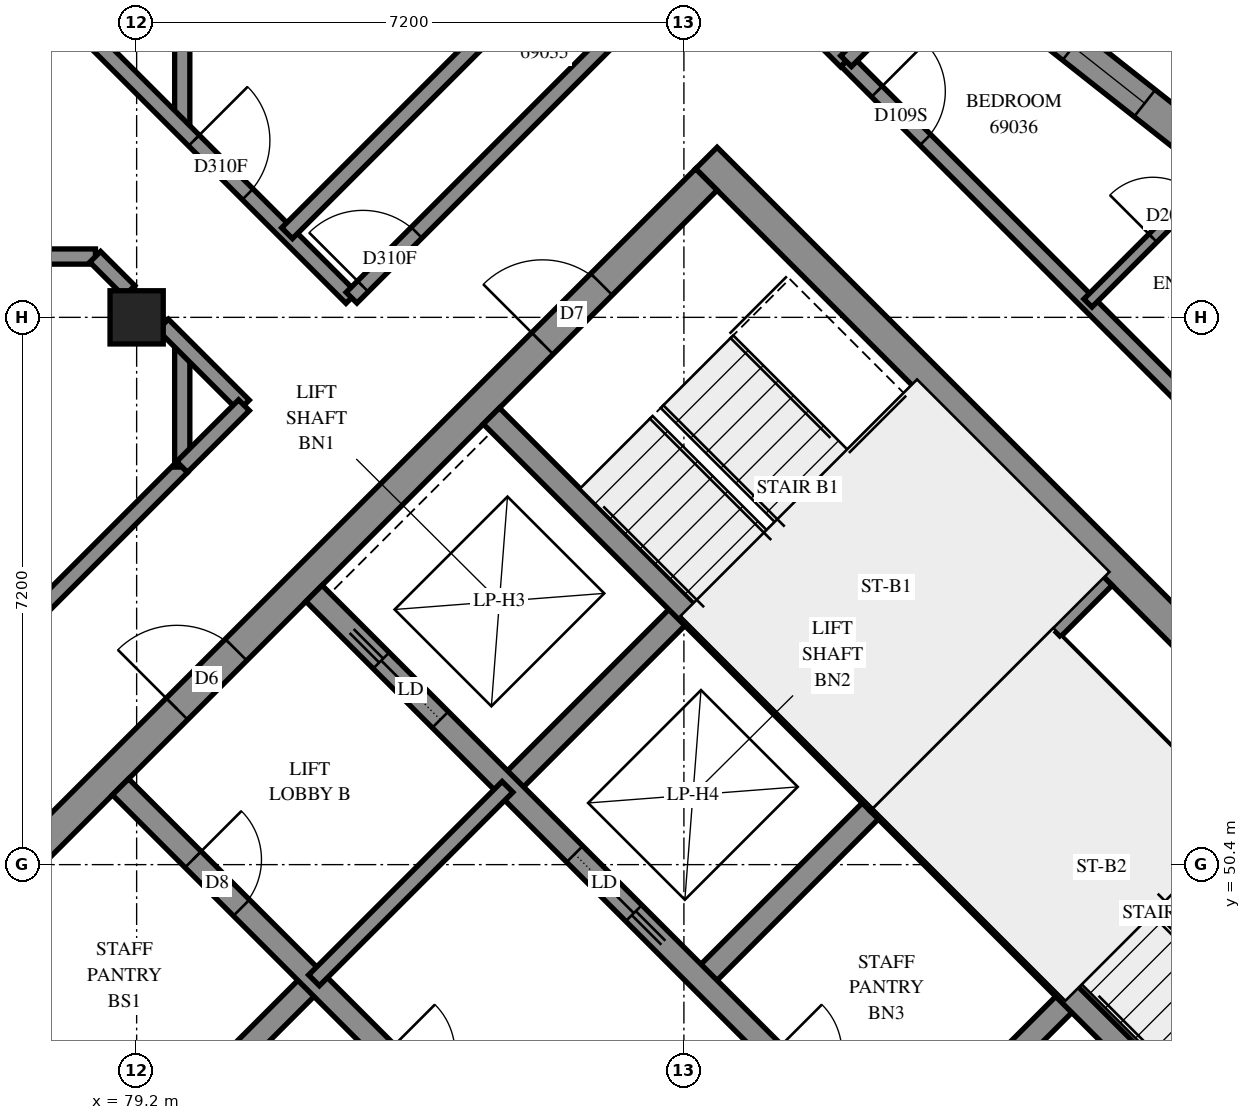
"""IFC4 building model, lengths in metres.
Left out: names, types, materials, properties, quantities, classifications, styles, units other than length and angle.
Written with IfcOpenShell. Run it as: python <this file> out.ifc"""

import sys

from ifc_helpers import new_model, si_unit, direction, frame, frame_2d, origin, origin_2d, place, context, subcontext, project, spatial, polyline, rectangle, outline, extrude, element, fill, save


model = new_model("IFC4")
c1 = context("Model", 3, precision=1e-05, world=origin(), true_north=direction((0.0, 1.0)))
c2 = subcontext(c1, "Body", "Model", "MODEL_VIEW")
j1 = project(units=[si_unit("LENGTHUNIT", "METRE"), si_unit("PLANEANGLEUNIT", "RADIAN")], contexts=[c1])
p1 = place(None, origin())
s1 = spatial("IfcSite", under=j1, at=p1, CompositionType="ELEMENT")
p2 = place(p1, origin())
s2 = spatial("IfcBuilding", under=s1, at=p2, CompositionType="ELEMENT")
p3 = place(p2, frame((0.0, 0.0, 254.0)))
s3 = spatial("IfcBuildingStorey", under=s2, at=p3, CompositionType="ELEMENT", Elevation=254.0)
p4 = place(p3, frame((79.2, 57.6, 0.0), z_axis=(0.0, 0.0, 1.0), x_axis=(1.0, 0.0, 0.0)))
e1 = element("IfcColumn", 1, at=p4, inside=s3, PredefinedType="COLUMN", context=c2, shape_type="SweptSolid", body=[
    extrude(rectangle(XDim=0.7, YDim=0.7, at=origin_2d()), origin(), (0.0, 0.0, 1.0), 3.1),
])
p5 = place(p3, frame((76.23, 49.231, -0.3), z_axis=(0.0, 0.0, 1.0), x_axis=(0.7071034917, -0.7071100706, 0.0)))
e2 = element("IfcWall", 2, at=p5, inside=s3, PredefinedType="SHEAR", context=c2, shape_type="SweptSolid", body=[
    extrude(rectangle(XDim=15.2, YDim=0.4, at=frame_2d((7.6, 0.0))), origin(), (0.0, 0.0, 1.0), 2.7),
])
p6 = place(p3, frame((86.695, 59.696, -0.3), z_axis=(0.0, 0.0, 1.0), x_axis=(0.7071100706, -0.7071034917, 0.0)))
e3 = element("IfcWall", 3, at=p6, inside=s3, PredefinedType="SHEAR", context=c2, shape_type="SweptSolid", body=[
    extrude(rectangle(XDim=15.2, YDim=0.4, at=frame_2d((7.6, 0.0))), origin(), (0.0, 0.0, 1.0), 2.7),
])
p7 = place(p6, frame((10.4, 0.0, 0.3)))
e4 = element("IfcOpeningElement", 4, at=p7, cuts=e3, PredefinedType="OPENING", context=c2, shape_type="SweptSolid", body=[
    extrude(rectangle(XDim=0.8, YDim=2.1, at=frame_2d((0.4, 1.05))), frame((0.0, 0.21, 0.0), z_axis=(0.0, -1.0, 0.0), x_axis=(1.0, 0.0, 0.0)), (0.0, 0.0, 1.0), 0.42),
])
p8 = place(p3, frame((76.513, 49.231, -0.3), z_axis=(0.0, 0.0, 1.0), x_axis=(0.7071067812, 0.7071067812, 0.0)))
e5 = element("IfcWall", 5, at=p8, inside=s3, PredefinedType="SHEAR", context=c2, shape_type="SweptSolid", body=[
    extrude(rectangle(XDim=14.4, YDim=0.4, at=frame_2d((7.2, 0.0))), origin(), (0.0, 0.0, 1.0), 2.7),
])
p9 = place(p8, frame((4.55, 0.0, 0.3)))
e6 = element("IfcOpeningElement", 6, at=p9, cuts=e5, PredefinedType="OPENING", context=c2, shape_type="SweptSolid", body=[
    extrude(rectangle(XDim=1.1, YDim=2.1, at=frame_2d((0.55, 1.05))), frame((0.0, 0.21, 0.0), z_axis=(0.0, -1.0, 0.0), x_axis=(1.0, 0.0, 0.0)), (0.0, 0.0, 1.0), 0.42),
])
p10 = place(p8, frame((11.35, 0.0, 0.3)))
e7 = element("IfcOpeningElement", 7, at=p10, cuts=e5, PredefinedType="OPENING", context=c2, shape_type="SweptSolid", body=[
    extrude(rectangle(XDim=1.1, YDim=2.1, at=frame_2d((0.55, 1.05))), frame((0.0, 0.21, 0.0), z_axis=(0.0, -1.0, 0.0), x_axis=(1.0, 0.0, 0.0)), (0.0, 0.0, 1.0), 0.42),
])
p11 = place(p3, frame((86.978, 38.766, -0.3), z_axis=(0.0, 0.0, 1.0), x_axis=(0.7071067812, 0.7071067812, 0.0)))
e8 = element("IfcWall", 8, at=p11, inside=s3, PredefinedType="SHEAR", context=c2, shape_type="SweptSolid", body=[
    extrude(rectangle(XDim=14.4, YDim=0.4, at=frame_2d((7.2, 0.0))), origin(), (0.0, 0.0, 1.0), 2.7),
])
p12 = place(p11, frame((4.55, 0.0, 0.3)))
e9 = element("IfcOpeningElement", 9, at=p12, cuts=e8, PredefinedType="OPENING", context=c2, shape_type="SweptSolid", body=[
    extrude(rectangle(XDim=1.1, YDim=2.1, at=frame_2d((0.55, 1.05))), frame((0.0, 0.21, 0.0), z_axis=(0.0, -1.0, 0.0), x_axis=(1.0, 0.0, 0.0)), (0.0, 0.0, 1.0), 0.42),
])
p13 = place(p11, frame((11.35, 0.0, 0.3)))
e10 = element("IfcOpeningElement", 10, at=p13, cuts=e8, PredefinedType="OPENING", context=c2, shape_type="SweptSolid", body=[
    extrude(rectangle(XDim=1.1, YDim=2.1, at=frame_2d((0.55, 1.05))), frame((0.0, 0.21, 0.0), z_axis=(0.0, -1.0, 0.0), x_axis=(1.0, 0.0, 0.0)), (0.0, 0.0, 1.0), 0.42),
])
for number, where, z_axis, x_axis in (
    (11, (79.2, 46.544, 0.0), (0.0, 0.0, 1.0), (0.707, 0.707, 0.0)),
    (12, (84.079, 51.423, 0.0), (0.0, 0.0, 1.0), (0.707, 0.707, 0.0)),
):
    element("IfcWall", number, at=place(p3, frame(where, z_axis=z_axis, x_axis=x_axis)), inside=s3, PredefinedType="SOLIDWALL", context=c2, shape_type="SweptSolid", body=[
        extrude(rectangle(XDim=3.3, YDim=0.3, at=frame_2d((1.65, 0.0))), origin(), (0.0, 0.0, 1.0), 3.1),
    ])
for number, where, z_axis, x_axis in (
    (13, (86.625, 48.878, 0.0), (0.0, 0.0, 1.0), (0.707, 0.707, 0.0)),
    (14, (89.17, 46.332, 0.0), (0.0, 0.0, 1.0), (0.707, 0.707, 0.0)),
):
    element("IfcWall", number, at=place(p3, frame(where, z_axis=z_axis, x_axis=x_axis)), inside=s3, PredefinedType="SOLIDWALL", context=c2, shape_type="SweptSolid", body=[
        extrude(rectangle(XDim=3.3, YDim=0.3, at=frame_2d((1.65, 0.0))), origin(), (0.0, 0.0, 1.0), 3.1),
    ])
p14 = place(p3, frame((78.988, 51.423, 0.0), z_axis=(0.0, 0.0, 1.0), x_axis=(0.7071067812, -0.7071067812, 0.0)))
e15 = element("IfcWall", 15, at=p14, inside=s3, PredefinedType="SOLIDWALL", context=c2, shape_type="SweptSolid", body=[
    extrude(rectangle(XDim=14.4, YDim=0.3, at=frame_2d((7.2, 0.0))), origin(), (0.0, 0.0, 1.0), 3.1),
])
p15 = place(p14, frame((1.35, 0.0, 0.0)))
e16 = element("IfcOpeningElement", 16, at=p15, cuts=e15, PredefinedType="OPENING", context=c2, shape_type="SweptSolid", body=[
    extrude(rectangle(XDim=0.9, YDim=2.1, at=frame_2d((0.45, 1.05))), frame((0.0, 0.16, 0.0), z_axis=(0.0, -1.0, 0.0), x_axis=(1.0, 0.0, 0.0)), (0.0, 0.0, 1.0), 0.32),
])
p16 = place(p14, frame((4.95, 0.0, 0.0)))
e17 = element("IfcOpeningElement", 17, at=p16, cuts=e15, PredefinedType="OPENING", context=c2, shape_type="SweptSolid", body=[
    extrude(rectangle(XDim=0.9, YDim=2.1, at=frame_2d((0.45, 1.05))), frame((0.0, 0.16, 0.0), z_axis=(0.0, -1.0, 0.0), x_axis=(1.0, 0.0, 0.0)), (0.0, 0.0, 1.0), 0.32),
])
p17 = place(p14, frame((8.55, 0.0, 0.0)))
e18 = element("IfcOpeningElement", 18, at=p17, cuts=e15, PredefinedType="OPENING", context=c2, shape_type="SweptSolid", body=[
    extrude(rectangle(XDim=0.9, YDim=2.1, at=frame_2d((0.45, 1.05))), frame((0.0, 0.16, 0.0), z_axis=(0.0, -1.0, 0.0), x_axis=(1.0, 0.0, 0.0)), (0.0, 0.0, 1.0), 0.32),
])
p18 = place(p14, frame((12.05, 0.0, 0.0)))
e19 = element("IfcOpeningElement", 19, at=p18, cuts=e15, PredefinedType="OPENING", context=c2, shape_type="SweptSolid", body=[
    extrude(rectangle(XDim=1.1, YDim=2.1, at=frame_2d((0.55, 1.05))), frame((0.0, 0.16, 0.0), z_axis=(0.0, -1.0, 0.0), x_axis=(1.0, 0.0, 0.0)), (0.0, 0.0, 1.0), 0.32),
])
p19 = place(p3, frame((81.534, 53.969, 0.0), z_axis=(0.0, 0.0, 1.0), x_axis=(0.707103309, -0.7071102534, 0.0)))
e20 = element("IfcWall", 20, at=p19, inside=s3, PredefinedType="SOLIDWALL", context=c2, shape_type="SweptSolid", body=[
    extrude(rectangle(XDim=14.4, YDim=0.3, at=frame_2d((7.2, 0.0))), origin(), (0.0, 0.0, 1.0), 3.1),
])
p20 = place(p19, frame((8.55, 0.0, 0.0)))
e21 = element("IfcOpeningElement", 21, at=p20, cuts=e20, PredefinedType="OPENING", context=c2, shape_type="SweptSolid", body=[
    extrude(rectangle(XDim=0.9, YDim=2.1, at=frame_2d((0.45, 1.05))), frame((0.0, 0.16, 0.0), z_axis=(0.0, -1.0, 0.0), x_axis=(1.0, 0.0, 0.0)), (0.0, 0.0, 1.0), 0.32),
])
p21 = place(p19, frame((1.25, 0.0, 0.0)))
e22 = element("IfcOpeningElement", 22, at=p21, cuts=e20, PredefinedType="OPENING", context=c2, shape_type="SweptSolid", body=[
    extrude(rectangle(XDim=1.1, YDim=2.1, at=frame_2d((0.55, 1.05))), frame((0.0, 0.16, 0.0), z_axis=(0.0, -1.0, 0.0), x_axis=(1.0, 0.0, 0.0)), (0.0, 0.0, 1.0), 0.32),
])
p22 = place(p19, frame((4.85, 0.0, 0.0)))
e23 = element("IfcOpeningElement", 23, at=p22, cuts=e20, PredefinedType="OPENING", context=c2, shape_type="SweptSolid", body=[
    extrude(rectangle(XDim=1.1, YDim=2.1, at=frame_2d((0.55, 1.05))), frame((0.0, 0.16, 0.0), z_axis=(0.0, -1.0, 0.0), x_axis=(1.0, 0.0, 0.0)), (0.0, 0.0, 1.0), 0.32),
])
p23 = place(p19, frame((12.05, 0.0, 0.0)))
e24 = element("IfcOpeningElement", 24, at=p23, cuts=e20, PredefinedType="OPENING", context=c2, shape_type="SweptSolid", body=[
    extrude(rectangle(XDim=1.1, YDim=2.1, at=frame_2d((0.55, 1.05))), frame((0.0, 0.16, 0.0), z_axis=(0.0, -1.0, 0.0), x_axis=(1.0, 0.0, 0.0)), (0.0, 0.0, 1.0), 0.32),
])
for number, where, z_axis, x_axis in (
    (25, (83.867, 56.302, 0.0), (0.0, 0.0, 1.0), (0.707, -0.707, 0.0)),
    (26, (88.958, 51.211, 0.0), (0.0, 0.0, 1.0), (0.707, -0.707, 0.0)),
):
    element("IfcWall", number, at=place(p3, frame(where, z_axis=z_axis, x_axis=x_axis)), inside=s3, PredefinedType="SOLIDWALL", context=c2, shape_type="SweptSolid", body=[
        extrude(rectangle(XDim=7.2, YDim=0.3, at=frame_2d((3.6, 0.0))), origin(), (0.0, 0.0, 1.0), 3.1),
    ])
p24 = place(p3, frame((88.958, 51.211, 0.0), z_axis=(0.0, 0.0, 1.0), x_axis=(0.7071067812, 0.7071067812, 0.0)))
e27 = element("IfcWall", 27, at=p24, inside=s3, PredefinedType="SOLIDWALL", context=c2, shape_type="SweptSolid", body=[
    extrude(rectangle(XDim=4.2, YDim=0.3, at=frame_2d((2.1, 0.0))), origin(), (0.0, 0.0, 1.0), 3.1),
])
p25 = place(p3, frame((93.654, 59.475, 0.0), z_axis=(0.0, 0.0, 1.0), x_axis=(-0.7847316147, 0.6198356984, 0.0)))
e28 = element("IfcWall", 28, at=p25, inside=s3, PredefinedType="SOLIDWALL", context=c2, shape_type="SweptSolid", body=[
    extrude(outline(polyline([(-0.026, -0.225), (3.327, -0.225), (3.38, 0.225), (0.026, 0.225), (-0.026, -0.225)])), origin(), (0.0, 0.0, 1.0), 3.1),
])
p26 = place(p25, frame((1.519, 0.0, 0.45)))
e29 = element("IfcOpeningElement", 29, at=p26, cuts=e28, PredefinedType="OPENING", context=c2, shape_type="SweptSolid", body=[
    extrude(rectangle(XDim=1.2, YDim=2.55, at=frame_2d((0.6, 1.275))), frame((0.0, 0.235, 0.0), z_axis=(0.0, -1.0, 0.0), x_axis=(1.0, 0.0, 0.0)), (0.0, 0.0, 1.0), 0.47),
])
p27 = place(p3, frame((91.313, 53.354, 0.0), z_axis=(0.0, 0.0, 1.0), x_axis=(0.7071140275, -0.7070995348, 0.0)))
e30 = element("IfcWall", 30, at=p27, inside=s3, PredefinedType="PARTITIONING", context=c2, shape_type="SweptSolid", body=[
    extrude(rectangle(XDim=6.9, YDim=0.15, at=frame_2d((3.45, 0.0))), origin(), (0.0, 0.0, 1.0), 3.1),
])
p28 = place(p3, frame((81.534, 48.878, 0.0), z_axis=(0.0, 0.0, 1.0), x_axis=(0.707092892, 0.7071206701, 0.0)))
e31 = element("IfcWall", 31, at=p28, inside=s3, PredefinedType="PARTITIONING", context=c2, shape_type="SweptSolid", body=[
    extrude(rectangle(XDim=3.6, YDim=0.2, at=frame_2d((1.8, 0.0))), origin(), (0.0, 0.0, 1.0), 3.1),
])
p29 = place(p3, frame((79.8, 60.086, 0.0), z_axis=(0.0, 0.0, 1.0), x_axis=(0.0, 1.0, 0.0)))
e32 = element("IfcWall", 32, at=p29, inside=s3, PredefinedType="PARTITIONING", context=c2, shape_type="SweptSolid", body=[
    extrude(rectangle(XDim=12.914, YDim=0.2, at=frame_2d((6.457, 0.0))), origin(), (0.0, 0.0, 1.0), 3.1),
])
p30 = place(p3, frame((74.397, 65.483, 0.0), z_axis=(0.0, 0.0, 1.0), x_axis=(0.7071067812, -0.7071067812, 0.0)))
e33 = element("IfcWall", 33, at=p30, inside=s3, PredefinedType="PARTITIONING", context=c2, shape_type="SweptSolid", body=[
    extrude(rectangle(XDim=10.788, YDim=0.2, at=frame_2d((5.394, 0.0))), origin(), (0.0, 0.0, 1.0), 3.1),
])
p31 = place(p30, frame((5.083, 0.0, 0.0)))
e34 = element("IfcOpeningElement", 34, at=p31, cuts=e33, PredefinedType="OPENING", context=c2, shape_type="SweptSolid", body=[
    extrude(rectangle(XDim=1.0, YDim=2.1, at=frame_2d((0.5, 1.05))), frame((0.0, 0.11, 0.0), z_axis=(0.0, -1.0, 0.0), x_axis=(1.0, 0.0, 0.0)), (0.0, 0.0, 1.0), 0.22),
])
p32 = place(p30, frame((7.858, 0.0, 0.0)))
e35 = element("IfcOpeningElement", 35, at=p32, cuts=e33, PredefinedType="OPENING", context=c2, shape_type="SweptSolid", body=[
    extrude(rectangle(XDim=1.0, YDim=2.1, at=frame_2d((0.5, 1.05))), frame((0.0, 0.11, 0.0), z_axis=(0.0, -1.0, 0.0), x_axis=(1.0, 0.0, 0.0)), (0.0, 0.0, 1.0), 0.22),
])
p33 = place(p3, frame((81.179, 58.707, 0.0), z_axis=(0.0, 0.0, 1.0), x_axis=(0.7071123688, 0.7071011936, 0.0)))
e36 = element("IfcWall", 36, at=p33, inside=s3, PredefinedType="PARTITIONING", context=c2, shape_type="SweptSolid", body=[
    extrude(rectangle(XDim=8.948, YDim=0.2, at=frame_2d((4.474, 0.0))), origin(), (0.0, 0.0, 1.0), 3.1),
])
p34 = place(p3, frame((82.028, 57.858, 0.0), z_axis=(0.0, 0.0, 1.0), x_axis=(0.7071067812, 0.7071067812, 0.0)))
e37 = element("IfcWall", 37, at=p34, inside=s3, PredefinedType="PARTITIONING", context=c2, shape_type="SweptSolid", body=[
    extrude(rectangle(XDim=6.8, YDim=0.2, at=frame_2d((3.4, 0.0))), origin(), (0.0, 0.0, 1.0), 3.1),
])
p35 = place(p34, frame((0.211, 0.0, 0.0)))
e38 = element("IfcOpeningElement", 38, at=p35, cuts=e37, PredefinedType="OPENING", context=c2, shape_type="SweptSolid", body=[
    extrude(rectangle(XDim=1.0, YDim=2.1, at=frame_2d((0.5, 1.05))), frame((0.0, 0.11, 0.0), z_axis=(0.0, -1.0, 0.0), x_axis=(1.0, 0.0, 0.0)), (0.0, 0.0, 1.0), 0.22),
])
p36 = place(p3, frame((88.537, 60.973, 0.0), z_axis=(0.0, 0.0, 1.0), x_axis=(0.7071067812, -0.7071067812, 0.0)))
e39 = element("IfcWall", 39, at=p36, inside=s3, PredefinedType="PARTITIONING", context=c2, shape_type="SweptSolid", body=[
    extrude(rectangle(XDim=6.401, YDim=0.2, at=frame_2d((3.2, 0.0))), origin(), (0.0, 0.0, 1.0), 3.1),
])
p37 = place(p36, frame((0.569, 0.0, 0.0)))
e40 = element("IfcOpeningElement", 40, at=p37, cuts=e39, PredefinedType="OPENING", context=c2, shape_type="SweptSolid", body=[
    extrude(rectangle(XDim=0.9, YDim=2.1, at=frame_2d((0.45, 1.05))), frame((0.0, 0.11, 0.0), z_axis=(0.0, -1.0, 0.0), x_axis=(1.0, 0.0, 0.0)), (0.0, 0.0, 1.0), 0.22),
])
p38 = place(p3, frame((74.402, 58.4, 0.0), z_axis=(0.0, 0.0, 1.0), x_axis=(1.0, 0.0, 0.0)))
e41 = element("IfcWall", 41, at=p38, inside=s3, PredefinedType="PARTITIONING", context=c2, shape_type="SweptSolid", body=[
    extrude(rectangle(XDim=4.256, YDim=0.2, at=frame_2d((2.128, 0.0))), origin(), (0.0, 0.0, 1.0), 3.1),
])
p39 = place(p38, frame((1.331, 0.0, 0.0)))
e42 = element("IfcOpeningElement", 42, at=p39, cuts=e41, PredefinedType="OPENING", context=c2, shape_type="SweptSolid", body=[
    extrude(rectangle(XDim=1.0, YDim=2.1, at=frame_2d((0.5, 1.05))), frame((0.0, 0.11, 0.0), z_axis=(0.0, -1.0, 0.0), x_axis=(1.0, 0.0, 0.0)), (0.0, 0.0, 1.0), 0.22),
])
p40 = place(p3, frame((77.37, 53.2, 0.0), z_axis=(0.0, 0.0, 1.0), x_axis=(0.7071067812, 0.7071067812, 0.0)))
e43 = element("IfcWall", 43, at=p40, inside=s3, PredefinedType="PARTITIONING", context=c2, shape_type="SweptSolid", body=[
    extrude(rectangle(XDim=3.437, YDim=0.2, at=frame_2d((1.718, 0.0))), origin(), (0.0, 0.0, 1.0), 3.1),
])
p41 = place(p3, frame((86.833, 62.663, 0.0), z_axis=(0.0, 0.0, 1.0), x_axis=(0.7075233388, -0.706689978, 0.0)))
e44 = element("IfcWall", 44, at=p41, inside=s3, PredefinedType="PARTITIONING", context=c2, shape_type="SweptSolid", body=[
    extrude(rectangle(XDim=2.4, YDim=0.2, at=frame_2d((1.2, 0.0))), origin(), (0.0, 0.0, 1.0), 3.1),
])
p42 = place(p3, frame((91.716, 57.788, 0.0), z_axis=(0.0, 0.0, 1.0), x_axis=(0.7070851944, 0.7071283673, 0.0)))
e45 = element("IfcWall", 45, at=p42, inside=s3, PredefinedType="PARTITIONING", context=c2, shape_type="SweptSolid", body=[
    extrude(rectangle(XDim=2.316, YDim=0.15, at=frame_2d((1.158, 0.0))), origin(), (0.0, 0.0, 1.0), 3.1),
])
p43 = place(p42, frame((1.209, 0.0, 0.0)))
e46 = element("IfcOpeningElement", 46, at=p43, cuts=e45, PredefinedType="OPENING", context=c2, shape_type="SweptSolid", body=[
    extrude(rectangle(XDim=0.8, YDim=2.1, at=frame_2d((0.4, 1.05))), frame((0.0, 0.085, 0.0), z_axis=(0.0, -1.0, 0.0), x_axis=(1.0, 0.0, 0.0)), (0.0, 0.0, 1.0), 0.17),
])
p44 = place(p3, frame((79.8, 55.63, 0.0), z_axis=(0.0, 0.0, 1.0), x_axis=(0.0, 1.0, 0.0)))
e47 = element("IfcWall", 47, at=p44, inside=s3, PredefinedType="PARTITIONING", context=c2, shape_type="SweptSolid", body=[
    extrude(rectangle(XDim=1.628, YDim=0.2, at=frame_2d((0.814, 0.0))), origin(), (0.0, 0.0, 1.0), 3.1),
])
p45 = place(p3, frame((79.547, 57.505, 0.0), z_axis=(0.0, 0.0, 1.0), x_axis=(0.7071067812, -0.7071067812, 0.0)))
e48 = element("IfcWall", 48, at=p45, inside=s3, PredefinedType="PARTITIONING", context=c2, shape_type="SweptSolid", body=[
    extrude(rectangle(XDim=1.505, YDim=0.2, at=frame_2d((0.752, 0.0))), origin(), (0.0, 0.0, 1.0), 3.1),
])
p46 = place(p3, frame((79.798, 55.632, 0.0), z_axis=(0.0, 0.0, 1.0), x_axis=(0.7079759957, 0.7062364969, 0.0)))
e49 = element("IfcWall", 49, at=p46, inside=s3, PredefinedType="PARTITIONING", context=c2, shape_type="SweptSolid", body=[
    extrude(rectangle(XDim=1.15, YDim=0.2, at=frame_2d((0.575, 0.0))), origin(), (0.0, 0.0, 1.0), 3.1),
])
p47 = place(p3, frame((88.534, 60.971, 0.0), z_axis=(0.0, 0.0, 1.0), x_axis=(0.7071067812, 0.7071067812, 0.0)))
e50 = element("IfcWall", 50, at=p47, inside=s3, PredefinedType="PARTITIONING", context=c2, shape_type="SweptSolid", body=[
    extrude(rectangle(XDim=0.704, YDim=0.2, at=frame_2d((0.352, 0.0))), origin(), (0.0, 0.0, 1.0), 3.1),
])
p48 = place(p3, frame((78.655, 58.397, 0.0), z_axis=(0.0, 0.0, 1.0), x_axis=(0.7071067812, -0.7071067812, 0.0)))
e51 = element("IfcWall", 51, at=p48, inside=s3, PredefinedType="PARTITIONING", context=c2, shape_type="SweptSolid", body=[
    extrude(rectangle(XDim=0.636, YDim=0.2, at=frame_2d((0.318, 0.0))), origin(), (0.0, 0.0, 1.0), 3.1),
])
p49 = place(p26, origin())
e52 = element("IfcWindow", 52, at=p49, inside=s3, PartitioningType="SINGLE_PANEL", PredefinedType="WINDOW", context=c2, shape_type="SweptSolid", body=[
    extrude(rectangle(XDim=1.2, YDim=2.55, at=frame_2d((0.6, 1.275))), frame((0.0, 0.205, 0.0), z_axis=(0.0, -1.0, 0.0), x_axis=(1.0, 0.0, 0.0)), (0.0, 0.0, 1.0), 0.06),
])
fill(e29, e52)
p50 = place(p9, origin())
e53 = element("IfcDoor", 53, at=p50, inside=s3, OperationType="DOUBLE_DOOR_SINGLE_SWING", PredefinedType="DOOR", context=c2, shape_type="SweptSolid", body=[
    extrude(rectangle(XDim=1.1, YDim=2.1, at=frame_2d((0.55, 1.05))), frame((0.0, 0.025, 0.0), z_axis=(0.0, -1.0, 0.0), x_axis=(1.0, 0.0, 0.0)), (0.0, 0.0, 1.0), 0.05),
])
fill(e6, e53)
p51 = place(p10, origin())
e54 = element("IfcDoor", 54, at=p51, inside=s3, OperationType="SINGLE_SWING_LEFT", PredefinedType="DOOR", context=c2, shape_type="SweptSolid", body=[
    extrude(rectangle(XDim=1.1, YDim=2.1, at=frame_2d((0.55, 1.05))), frame((0.0, 0.025, 0.0), z_axis=(0.0, -1.0, 0.0), x_axis=(1.0, 0.0, 0.0)), (0.0, 0.0, 1.0), 0.05),
])
fill(e7, e54)
p52 = place(p15, origin())
e55 = element("IfcDoor", 55, at=p52, inside=s3, OperationType="SINGLE_SWING_LEFT", PredefinedType="DOOR", context=c2, shape_type="SweptSolid", body=[
    extrude(rectangle(XDim=0.9, YDim=2.1, at=frame_2d((0.45, 1.05))), frame((0.0, 0.025, 0.0), z_axis=(0.0, -1.0, 0.0), x_axis=(1.0, 0.0, 0.0)), (0.0, 0.0, 1.0), 0.05),
])
fill(e16, e55)
p53 = place(p21, origin())
e56 = element("IfcDoor", 56, at=p53, inside=s3, OperationType="SLIDING_TO_LEFT", PredefinedType="DOOR", context=c2, shape_type="SweptSolid", body=[
    extrude(rectangle(XDim=1.1, YDim=2.1, at=frame_2d((0.55, 1.05))), frame((0.0, 0.025, 0.0), z_axis=(0.0, -1.0, 0.0), x_axis=(1.0, 0.0, 0.0)), (0.0, 0.0, 1.0), 0.05),
])
fill(e22, e56)
p54 = place(p22, origin())
e57 = element("IfcDoor", 57, at=p54, inside=s3, OperationType="SLIDING_TO_RIGHT", PredefinedType="DOOR", context=c2, shape_type="SweptSolid", body=[
    extrude(rectangle(XDim=1.1, YDim=2.1, at=frame_2d((0.55, 1.05))), frame((0.0, 0.025, 0.0), z_axis=(0.0, -1.0, 0.0), x_axis=(1.0, 0.0, 0.0)), (0.0, 0.0, 1.0), 0.05),
])
fill(e23, e57)
p55 = place(p32, origin())
e58 = element("IfcDoor", 58, at=p55, inside=s3, OperationType="SINGLE_SWING_LEFT", PredefinedType="DOOR", context=c2, shape_type="SweptSolid", body=[
    extrude(rectangle(XDim=1.0, YDim=2.1, at=frame_2d((0.5, 1.05))), frame((0.0, 0.025, 0.0), z_axis=(0.0, -1.0, 0.0), x_axis=(1.0, 0.0, 0.0)), (0.0, 0.0, 1.0), 0.05),
])
fill(e35, e58)
p56 = place(p35, origin())
e59 = element("IfcDoor", 59, at=p56, inside=s3, OperationType="SINGLE_SWING_RIGHT", PredefinedType="DOOR", context=c2, shape_type="SweptSolid", body=[
    extrude(rectangle(XDim=1.0, YDim=2.1, at=frame_2d((0.5, 1.05))), frame((0.0, 0.025, 0.0), z_axis=(0.0, -1.0, 0.0), x_axis=(1.0, 0.0, 0.0)), (0.0, 0.0, 1.0), 0.05),
])
fill(e38, e59)
p57 = place(p37, origin())
e60 = element("IfcDoor", 60, at=p57, inside=s3, OperationType="SINGLE_SWING_LEFT", PredefinedType="DOOR", context=c2, shape_type="SweptSolid", body=[
    extrude(rectangle(XDim=0.9, YDim=2.1, at=frame_2d((0.45, 1.05))), frame((0.0, 0.025, 0.0), z_axis=(0.0, -1.0, 0.0), x_axis=(1.0, 0.0, 0.0)), (0.0, 0.0, 1.0), 0.05),
])
fill(e40, e60)
p58 = place(p43, origin())
e61 = element("IfcDoor", 61, at=p58, inside=s3, OperationType="SINGLE_SWING_RIGHT", PredefinedType="DOOR", context=c2, shape_type="SweptSolid", body=[
    extrude(rectangle(XDim=0.8, YDim=2.1, at=frame_2d((0.4, 1.05))), frame((0.0, 0.025, 0.0), z_axis=(0.0, -1.0, 0.0), x_axis=(1.0, 0.0, 0.0)), (0.0, 0.0, 1.0), 0.05),
])
fill(e46, e61)
save(model, sys.argv[1])
